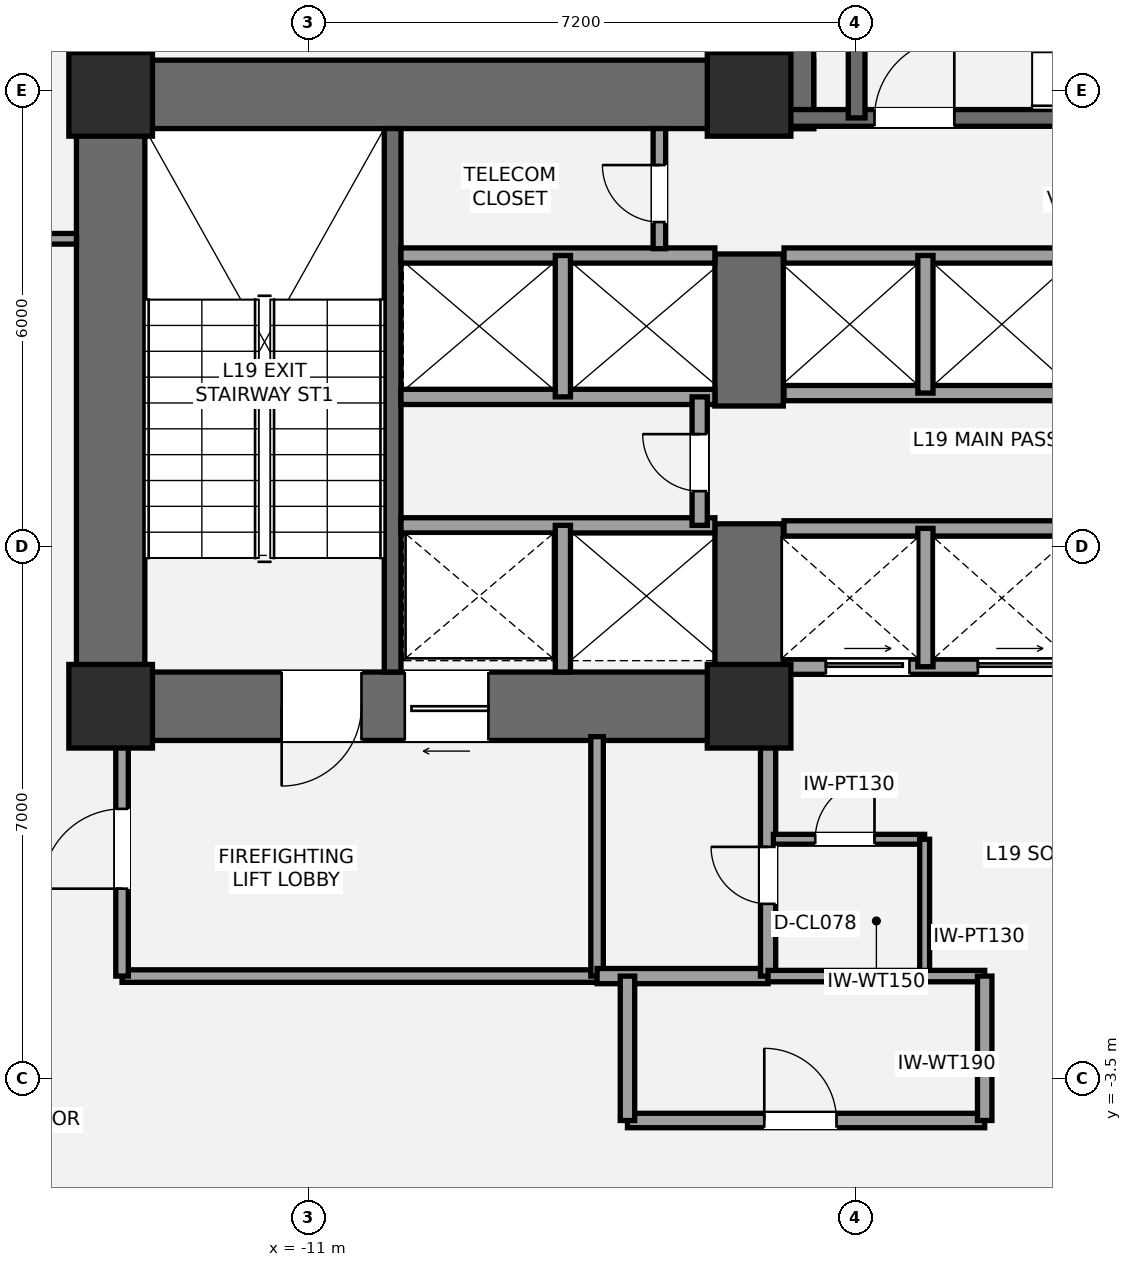
"""IFC4 building model, lengths in metres.
Left out: names, types, materials, properties, quantities, classifications, styles, units other than length and angle.
Written with IfcOpenShell. Run it as: python <this file> out.ifc"""

import sys

from ifc_helpers import new_model, si_unit, direction, frame, frame_2d, origin, origin_2d, place, context, subcontext, project, spatial, rectangle, extrude, element, fill, save


model = new_model("IFC4")
c1 = context("Model", 3, precision=1e-05, world=origin(), true_north=direction((0.0, 1.0)))
c2 = subcontext(c1, "Body", "Model", "MODEL_VIEW")
j1 = project(units=[si_unit("LENGTHUNIT", "METRE"), si_unit("PLANEANGLEUNIT", "RADIAN")], contexts=[c1])
p1 = place(None, origin())
s1 = spatial("IfcSite", under=j1, at=p1, CompositionType="ELEMENT")
p2 = place(p1, origin())
s2 = spatial("IfcBuilding", under=s1, at=p2, CompositionType="ELEMENT")
p3 = place(p2, frame((0.0, 0.0, 73.8)))
s3 = spatial("IfcBuildingStorey", under=s2, at=p3, CompositionType="ELEMENT", Elevation=73.8)
p4 = place(p3, frame((-13.6, 0.95, 0.0), z_axis=(0.0, 0.0, 1.0), x_axis=(0.0, 1.0, 0.0)))
e1 = element("IfcWall", 1, at=p4, inside=s3, PredefinedType="SHEAR", context=c2, shape_type="SweptSolid", body=[
    extrude(rectangle(XDim=8.95, YDim=0.9, at=frame_2d((4.475, 0.0))), origin(), (0.0, 0.0, 1.0), 3.6),
])
p5 = place(p3, frame((-14.05, 9.45, 0.0), z_axis=(0.0, 0.0, 1.0), x_axis=(1.0, 0.0, 0.0)))
e2 = element("IfcWall", 2, at=p5, inside=s3, PredefinedType="SHEAR", context=c2, shape_type="SweptSolid", body=[
    extrude(rectangle(XDim=9.7, YDim=0.9, at=frame_2d((4.85, 0.0))), origin(), (0.0, 0.0, 1.0), 3.6),
])
p6 = place(p3, frame((-4.75, 1.4, 0.0), z_axis=(0.0, 0.0, 1.0), x_axis=(-1.0, 0.0, 0.0)))
e3 = element("IfcWall", 3, at=p6, inside=s3, PredefinedType="SHEAR", context=c2, shape_type="SweptSolid", body=[
    extrude(rectangle(XDim=9.3, YDim=0.9, at=frame_2d((4.65, 0.0))), origin(), (0.0, 0.0, 1.0), 3.6),
])
p7 = place(p6, frame((5.55, 0.0, 0.0)))
e4 = element("IfcOpeningElement", 4, at=p7, cuts=e3, PredefinedType="OPENING", context=c2, shape_type="SweptSolid", body=[
    extrude(rectangle(XDim=1.05, YDim=2.15, at=frame_2d((0.525, 1.075))), frame((0.0, 0.46, 0.0), z_axis=(0.0, -1.0, 0.0), x_axis=(1.0, 0.0, 0.0)), (0.0, 0.0, 1.0), 0.92),
])
p8 = place(p6, frame((3.88, 0.0, 0.0)))
e5 = element("IfcOpeningElement", 5, at=p8, cuts=e3, PredefinedType="OPENING", context=c2, shape_type="SweptSolid", body=[
    extrude(rectangle(XDim=1.1, YDim=2.2, at=frame_2d((0.55, 1.1))), frame((0.0, 0.46, 0.0), z_axis=(0.0, -1.0, 0.0), x_axis=(1.0, 0.0, 0.0)), (0.0, 0.0, 1.0), 0.92),
])
p9 = place(p3, frame((-5.2, 0.95, 0.0), z_axis=(0.0, 0.0, 1.0), x_axis=(0.0, 1.0, 0.0)))
e6 = element("IfcWall", 6, at=p9, inside=s3, PredefinedType="SHEAR", context=c2, shape_type="SweptSolid", body=[
    extrude(rectangle(XDim=2.85, YDim=0.9, at=frame_2d((1.425, 0.0))), origin(), (0.0, 0.0, 1.0), 3.6),
])
p10 = place(p3, frame((-5.2, 5.35, 0.0), z_axis=(0.0, 0.0, 1.0), x_axis=(0.0, 1.0, 0.0)))
e7 = element("IfcWall", 7, at=p10, inside=s3, PredefinedType="SHEAR", context=c2, shape_type="SweptSolid", body=[
    extrude(rectangle(XDim=2.0, YDim=0.9, at=frame_2d((1.0, 0.0))), origin(), (0.0, 0.0, 1.0), 3.6),
])
p11 = place(p3, frame((-9.89, 1.85, 0.0), z_axis=(0.0, 0.0, 1.0), x_axis=(0.0, 1.0, 0.0)))
e8 = element("IfcWall", 8, at=p11, inside=s3, PredefinedType="SHEAR", context=c2, shape_type="SweptSolid", body=[
    extrude(rectangle(XDim=7.15, YDim=0.22, at=frame_2d((3.575, 0.0))), origin(), (0.0, 0.0, 1.0), 3.6),
])
p12 = place(p3, frame((-4.8, 9.0, 0.0), z_axis=(0.0, 0.0, 1.0), x_axis=(0.0, 1.0, 0.0)))
e9 = element("IfcWall", 9, at=p12, inside=s3, PredefinedType="SHEAR", context=c2, shape_type="SweptSolid", body=[
    extrude(rectangle(XDim=4.3, YDim=0.9, at=frame_2d((2.15, 0.0))), origin(), (0.0, 0.0, 1.0), 3.6),
])
p13 = place(p3, frame((-4.7, 9.14, 0.0), z_axis=(0.0, 0.0, 1.0), x_axis=(1.0, 0.0, 0.0)))
e10 = element("IfcWall", 10, at=p13, inside=s3, PredefinedType="SHEAR", context=c2, shape_type="SweptSolid", body=[
    extrude(rectangle(XDim=9.3, YDim=0.22, at=frame_2d((4.65, 0.0))), origin(), (0.0, 0.0, 1.0), 3.6),
])
p14 = place(p13, frame((1.15, 0.0, 0.0)))
e11 = element("IfcOpeningElement", 11, at=p14, cuts=e10, PredefinedType="OPENING", context=c2, shape_type="SweptSolid", body=[
    extrude(rectangle(XDim=1.05, YDim=2.15, at=frame_2d((0.525, 1.075))), frame((0.0, 0.12, 0.0), z_axis=(0.0, -1.0, 0.0), x_axis=(1.0, 0.0, 0.0)), (0.0, 0.0, 1.0), 0.24),
])
p15 = place(p3, frame((-3.785, 9.14, 0.0), z_axis=(0.0, 0.0, 1.0), x_axis=(0.0, 1.0, 0.0)))
e12 = element("IfcWall", 12, at=p15, inside=s3, PredefinedType="SHEAR", context=c2, shape_type="SweptSolid", body=[
    extrude(rectangle(XDim=3.26, YDim=0.22, at=frame_2d((1.63, 0.0))), origin(), (0.0, 0.0, 1.0), 3.6),
])
for number, where, z_axis, x_axis in (
    (13, (-13.6, 1.4, 0.0), (0.0, 0.0, 1.0), (1.0, 0.0, 0.0)),
    (14, (-13.6, 9.45, 0.0), (0.0, 0.0, 1.0), (1.0, 0.0, 0.0)),
    (15, (-5.2, 1.4, 0.0), (0.0, 0.0, 1.0), (1.0, 0.0, 0.0)),
    (16, (-5.2, 9.45, 0.0), (0.0, 0.0, 1.0), (1.0, 0.0, 0.0)),
):
    element("IfcColumn", number, at=place(p3, frame(where, z_axis=z_axis, x_axis=x_axis)), inside=s3, PredefinedType="COLUMN", context=c2, shape_type="SweptSolid", body=[
        extrude(rectangle(XDim=1.1, YDim=1.1, at=origin_2d()), origin(), (0.0, 0.0, 1.0), 3.6),
    ])
p16 = place(p3, frame((-13.45, -2.15, 0.0), z_axis=(0.0, 0.0, 1.0), x_axis=(1.0, 0.0, 0.0)))
e17 = element("IfcWall", 17, at=p16, inside=s3, PredefinedType="PARTITIONING", context=c2, shape_type="SweptSolid", body=[
    extrude(rectangle(XDim=6.25, YDim=0.165, at=frame_2d((3.125, 0.0))), origin(), (0.0, 0.0, 1.0), 2.813),
])
p17 = place(p3, frame((-13.45, -2.15, 0.0), z_axis=(0.0, 0.0, 1.0), x_axis=(0.0, 1.0, 0.0)))
e18 = element("IfcWall", 18, at=p17, inside=s3, PredefinedType="PARTITIONING", context=c2, shape_type="SweptSolid", body=[
    extrude(rectangle(XDim=3.15, YDim=0.165, at=frame_2d((1.575, 0.0))), origin(), (0.0, 0.0, 1.0), 2.813),
])
p18 = place(p17, frame((1.15, 0.0, 0.0)))
e19 = element("IfcOpeningElement", 19, at=p18, cuts=e18, PredefinedType="OPENING", context=c2, shape_type="SweptSolid", body=[
    extrude(rectangle(XDim=1.05, YDim=2.15, at=frame_2d((0.525, 1.075))), frame((0.0, 0.093, 0.0), z_axis=(0.0, -1.0, 0.0), x_axis=(1.0, 0.0, 0.0)), (0.0, 0.0, 1.0), 0.185),
])
p19 = place(p3, frame((-7.2, -2.15, 0.0), z_axis=(0.0, 0.0, 1.0), x_axis=(0.0, 1.0, 0.0)))
e20 = element("IfcWall", 20, at=p19, inside=s3, PredefinedType="PARTITIONING", context=c2, shape_type="SweptSolid", body=[
    extrude(rectangle(XDim=3.15, YDim=0.165, at=frame_2d((1.575, 0.0))), origin(), (0.0, 0.0, 1.0), 2.813),
])
p20 = place(p3, frame((-7.2, -2.15, 0.0), z_axis=(0.0, 0.0, 1.0), x_axis=(1.0, 0.0, 0.0)))
e21 = element("IfcWall", 21, at=p20, inside=s3, PredefinedType="SOLIDWALL", context=c2, shape_type="SweptSolid", body=[
    extrude(rectangle(XDim=2.25, YDim=0.2, at=frame_2d((1.125, 0.0))), origin(), (0.0, 0.0, 1.0), 3.36),
])
p21 = place(p3, frame((-4.95, -2.15, 0.0), z_axis=(0.0, 0.0, 1.0), x_axis=(0.0, 1.0, 0.0)))
e22 = element("IfcWall", 22, at=p21, inside=s3, PredefinedType="SOLIDWALL", context=c2, shape_type="SweptSolid", body=[
    extrude(rectangle(XDim=3.15, YDim=0.2, at=frame_2d((1.575, 0.0))), origin(), (0.0, 0.0, 1.0), 2.813),
])
p22 = place(p21, frame((0.95, 0.0, 0.0)))
e23 = element("IfcOpeningElement", 23, at=p22, cuts=e22, PredefinedType="OPENING", context=c2, shape_type="SweptSolid", body=[
    extrude(rectangle(XDim=0.75, YDim=2.1, at=frame_2d((0.375, 1.05))), frame((0.0, 0.11, 0.0), z_axis=(0.0, -1.0, 0.0), x_axis=(1.0, 0.0, 0.0)), (0.0, 0.0, 1.0), 0.22),
])
p23 = place(p3, frame((-4.88, -0.35, 0.0), z_axis=(0.0, 0.0, 1.0), x_axis=(1.0, 0.0, 0.0)))
e24 = element("IfcWall", 24, at=p23, inside=s3, PredefinedType="PARTITIONING", context=c2, shape_type="SweptSolid", body=[
    extrude(rectangle(XDim=1.99, YDim=0.13, at=frame_2d((0.995, 0.0))), origin(), (0.0, 0.0, 1.0), 3.36),
])
p24 = place(p23, frame((0.55, 0.0, 0.0)))
e25 = element("IfcOpeningElement", 25, at=p24, cuts=e24, PredefinedType="OPENING", context=c2, shape_type="SweptSolid", body=[
    extrude(rectangle(XDim=0.78, YDim=2.1, at=frame_2d((0.39, 1.05))), frame((0.0, 0.075, 0.0), z_axis=(0.0, -1.0, 0.0), x_axis=(1.0, 0.0, 0.0)), (0.0, 0.0, 1.0), 0.15),
])
p25 = place(p3, frame((-2.89, -2.15, 0.0), z_axis=(0.0, 0.0, 1.0), x_axis=(0.0, 1.0, 0.0)))
e26 = element("IfcWall", 26, at=p25, inside=s3, PredefinedType="PARTITIONING", context=c2, shape_type="SweptSolid", body=[
    extrude(rectangle(XDim=1.8, YDim=0.13, at=frame_2d((0.9, 0.0))), origin(), (0.0, 0.0, 1.0), 3.36),
])
p26 = place(p3, frame((-9.78, 3.78, 0.0), z_axis=(0.0, 0.0, 1.0), x_axis=(1.0, 0.0, 0.0)))
e27 = element("IfcWall", 27, at=p26, inside=s3, PredefinedType="SOLIDWALL", context=c2, shape_type="SweptSolid", body=[
    extrude(rectangle(XDim=4.13, YDim=0.2, at=frame_2d((2.065, 0.0))), origin(), (0.0, 0.0, 1.0), 3.36),
])
p27 = place(p3, frame((-7.65, 1.85, 0.0), z_axis=(0.0, 0.0, 1.0), x_axis=(0.0, 1.0, 0.0)))
e28 = element("IfcWall", 28, at=p27, inside=s3, PredefinedType="SOLIDWALL", context=c2, shape_type="SweptSolid", body=[
    extrude(rectangle(XDim=1.93, YDim=0.2, at=frame_2d((0.965, 0.0))), origin(), (0.0, 0.0, 1.0), 3.36),
])
for number, where, z_axis, x_axis in (
    (29, (-9.78, 5.47, 0.0), (0.0, 0.0, 1.0), (1.0, 0.0, 0.0)),
    (30, (-9.78, 7.33, 0.0), (0.0, 0.0, 1.0), (1.0, 0.0, 0.0)),
):
    element("IfcWall", number, at=place(p3, frame(where, z_axis=z_axis, x_axis=x_axis)), inside=s3, PredefinedType="SOLIDWALL", context=c2, shape_type="SweptSolid", body=[
        extrude(rectangle(XDim=4.13, YDim=0.2, at=frame_2d((2.065, 0.0))), origin(), (0.0, 0.0, 1.0), 3.36),
    ])
p28 = place(p3, frame((-7.65, 5.47, 0.0), z_axis=(0.0, 0.0, 1.0), x_axis=(0.0, 1.0, 0.0)))
e31 = element("IfcWall", 31, at=p28, inside=s3, PredefinedType="SOLIDWALL", context=c2, shape_type="SweptSolid", body=[
    extrude(rectangle(XDim=1.86, YDim=0.2, at=frame_2d((0.93, 0.0))), origin(), (0.0, 0.0, 1.0), 3.36),
])
p29 = place(p3, frame((-5.85, 3.78, 0.0), z_axis=(0.0, 0.0, 1.0), x_axis=(0.0, 1.0, 0.0)))
e32 = element("IfcWall", 32, at=p29, inside=s3, PredefinedType="SOLIDWALL", context=c2, shape_type="SweptSolid", body=[
    extrude(rectangle(XDim=1.69, YDim=0.2, at=frame_2d((0.845, 0.0))), origin(), (0.0, 0.0, 1.0), 3.36),
])
p30 = place(p29, frame((0.45, 0.0, 0.0)))
e33 = element("IfcOpeningElement", 33, at=p30, cuts=e32, PredefinedType="OPENING", context=c2, shape_type="SweptSolid", body=[
    extrude(rectangle(XDim=0.75, YDim=2.1, at=frame_2d((0.375, 1.05))), frame((0.0, 0.11, 0.0), z_axis=(0.0, -1.0, 0.0), x_axis=(1.0, 0.0, 0.0)), (0.0, 0.0, 1.0), 0.22),
])
p31 = place(p3, frame((-4.74, 1.92, 0.0), z_axis=(0.0, 0.0, 1.0), x_axis=(1.0, 0.0, 0.0)))
e34 = element("IfcWall", 34, at=p31, inside=s3, PredefinedType="SOLIDWALL", context=c2, shape_type="SweptSolid", body=[
    extrude(rectangle(XDim=3.86, YDim=0.2, at=frame_2d((1.93, 0.0))), origin(), (0.0, 0.0, 1.0), 2.35),
])
p32 = place(p31, frame((0.55, 0.0, 0.0)))
e35 = element("IfcOpeningElement", 35, at=p32, cuts=e34, PredefinedType="OPENING", context=c2, shape_type="SweptSolid", body=[
    extrude(rectangle(XDim=1.1, YDim=2.2, at=frame_2d((0.55, 1.1))), frame((0.0, 0.11, 0.0), z_axis=(0.0, -1.0, 0.0), x_axis=(1.0, 0.0, 0.0)), (0.0, 0.0, 1.0), 0.22),
])
p33 = place(p31, frame((2.55, 0.0, 0.0)))
e36 = element("IfcOpeningElement", 36, at=p33, cuts=e34, PredefinedType="OPENING", context=c2, shape_type="SweptSolid", body=[
    extrude(rectangle(XDim=1.1, YDim=2.2, at=frame_2d((0.55, 1.1))), frame((0.0, 0.11, 0.0), z_axis=(0.0, -1.0, 0.0), x_axis=(1.0, 0.0, 0.0)), (0.0, 0.0, 1.0), 0.22),
])
p34 = place(p3, frame((-4.74, 3.74, 0.0), z_axis=(0.0, 0.0, 1.0), x_axis=(1.0, 0.0, 0.0)))
e37 = element("IfcWall", 37, at=p34, inside=s3, PredefinedType="SOLIDWALL", context=c2, shape_type="SweptSolid", body=[
    extrude(rectangle(XDim=3.86, YDim=0.2, at=frame_2d((1.93, 0.0))), origin(), (0.0, 0.0, 1.0), 3.36),
])
p35 = place(p3, frame((-2.88, 1.92, 0.0), z_axis=(0.0, 0.0, 1.0), x_axis=(0.0, 1.0, 0.0)))
e38 = element("IfcWall", 38, at=p35, inside=s3, PredefinedType="SOLIDWALL", context=c2, shape_type="SweptSolid", body=[
    extrude(rectangle(XDim=1.82, YDim=0.2, at=frame_2d((0.91, 0.0))), origin(), (0.0, 0.0, 1.0), 3.36),
])
for number, where, z_axis, x_axis in (
    (39, (-4.74, 5.52, 0.0), (0.0, 0.0, 1.0), (1.0, 0.0, 0.0)),
    (40, (-4.74, 7.33, 0.0), (0.0, 0.0, 1.0), (1.0, 0.0, 0.0)),
):
    element("IfcWall", number, at=place(p3, frame(where, z_axis=z_axis, x_axis=x_axis)), inside=s3, PredefinedType="SOLIDWALL", context=c2, shape_type="SweptSolid", body=[
        extrude(rectangle(XDim=3.86, YDim=0.2, at=frame_2d((1.93, 0.0))), origin(), (0.0, 0.0, 1.0), 3.36),
    ])
p36 = place(p3, frame((-2.88, 5.52, 0.0), z_axis=(0.0, 0.0, 1.0), x_axis=(0.0, 1.0, 0.0)))
e41 = element("IfcWall", 41, at=p36, inside=s3, PredefinedType="SOLIDWALL", context=c2, shape_type="SweptSolid", body=[
    extrude(rectangle(XDim=1.81, YDim=0.2, at=frame_2d((0.905, 0.0))), origin(), (0.0, 0.0, 1.0), 3.36),
])
p37 = place(p3, frame((-6.38, 7.42, 0.0), z_axis=(0.0, 0.0, 1.0), x_axis=(0.0, 1.0, 0.0)))
e42 = element("IfcWall", 42, at=p37, inside=s3, PredefinedType="PARTITIONING", context=c2, shape_type="SweptSolid", body=[
    extrude(rectangle(XDim=1.58, YDim=0.165, at=frame_2d((0.79, 0.0))), origin(), (0.0, 0.0, 1.0), 3.36),
])
p38 = place(p37, frame((0.35, 0.0, 0.0)))
e43 = element("IfcOpeningElement", 43, at=p38, cuts=e42, PredefinedType="OPENING", context=c2, shape_type="SweptSolid", body=[
    extrude(rectangle(XDim=0.75, YDim=2.1, at=frame_2d((0.375, 1.05))), frame((0.0, 0.093, 0.0), z_axis=(0.0, -1.0, 0.0), x_axis=(1.0, 0.0, 0.0)), (0.0, 0.0, 1.0), 0.185),
])
p39 = place(p3, frame((-6.8, -4.05, 0.0), z_axis=(0.0, 0.0, 1.0), x_axis=(1.0, 0.0, 0.0)))
e44 = element("IfcWall", 44, at=p39, inside=s3, PredefinedType="PLUMBINGWALL", context=c2, shape_type="SweptSolid", body=[
    extrude(rectangle(XDim=4.7, YDim=0.19, at=frame_2d((2.35, 0.0))), origin(), (0.0, 0.0, 1.0), 2.893),
])
p40 = place(p39, frame((1.8, 0.0, 0.0)))
e45 = element("IfcOpeningElement", 45, at=p40, cuts=e44, PredefinedType="OPENING", context=c2, shape_type="SweptSolid", body=[
    extrude(rectangle(XDim=0.95, YDim=2.15, at=frame_2d((0.475, 1.075))), frame((0.0, 0.105, 0.0), z_axis=(0.0, -1.0, 0.0), x_axis=(1.0, 0.0, 0.0)), (0.0, 0.0, 1.0), 0.21),
])
p41 = place(p3, frame((-4.95, -2.15, 0.0), z_axis=(0.0, 0.0, 1.0), x_axis=(1.0, 0.0, 0.0)))
e46 = element("IfcWall", 46, at=p41, inside=s3, PredefinedType="PLUMBINGWALL", context=c2, shape_type="SweptSolid", body=[
    extrude(rectangle(XDim=2.85, YDim=0.15, at=frame_2d((1.425, 0.0))), origin(), (0.0, 0.0, 1.0), 3.36),
])
for number, where, z_axis, x_axis in (
    (47, (-6.8, -4.05, 0.0), (0.0, 0.0, 1.0), (0.0, 1.0, 0.0)),
    (48, (-2.1, -4.05, 0.0), (0.0, 0.0, 1.0), (0.0, 1.0, 0.0)),
):
    element("IfcWall", number, at=place(p3, frame(where, z_axis=z_axis, x_axis=x_axis)), inside=s3, PredefinedType="PLUMBINGWALL", context=c2, shape_type="SweptSolid", body=[
        extrude(rectangle(XDim=1.9, YDim=0.19, at=frame_2d((0.95, 0.0))), origin(), (0.0, 0.0, 1.0), 3.36),
    ])
p42 = place(p3, frame((-26.248, 7.55, 0.0), z_axis=(0.0, 0.0, 1.0), x_axis=(1.0, 0.0, 0.0)))
e49 = element("IfcWall", 49, at=p42, inside=s3, PredefinedType="PARTITIONING", context=c2, shape_type="SweptSolid", body=[
    extrude(rectangle(XDim=12.198, YDim=0.14, at=frame_2d((6.099, 0.0))), origin(), (0.0, 0.0, 1.0), 2.813),
])
p43 = place(p42, frame((1.823, 0.0, 0.0)))
e50 = element("IfcOpeningElement", 50, at=p43, cuts=e49, PredefinedType="OPENING", context=c2, shape_type="SweptSolid", body=[
    extrude(rectangle(XDim=0.92, YDim=2.15, at=frame_2d((0.46, 1.075))), frame((0.0, 0.08, 0.0), z_axis=(0.0, -1.0, 0.0), x_axis=(1.0, 0.0, 0.0)), (0.0, 0.0, 1.0), 0.16),
])
p44 = place(p7, origin())
e51 = element("IfcDoor", 51, at=p44, inside=s3, OperationType="SINGLE_SWING_RIGHT", PredefinedType="DOOR", context=c2, shape_type="SweptSolid", body=[
    extrude(rectangle(XDim=1.05, YDim=2.15, at=frame_2d((0.525, 1.075))), frame((0.0, 0.025, 0.0), z_axis=(0.0, -1.0, 0.0), x_axis=(1.0, 0.0, 0.0)), (0.0, 0.0, 1.0), 0.05),
])
fill(e4, e51)
p45 = place(p14, origin())
e52 = element("IfcDoor", 52, at=p45, inside=s3, OperationType="SINGLE_SWING_RIGHT", PredefinedType="DOOR", context=c2, shape_type="SweptSolid", body=[
    extrude(rectangle(XDim=1.05, YDim=2.15, at=frame_2d((0.525, 1.075))), frame((0.0, 0.025, 0.0), z_axis=(0.0, -1.0, 0.0), x_axis=(1.0, 0.0, 0.0)), (0.0, 0.0, 1.0), 0.05),
])
fill(e11, e52)
p46 = place(p18, origin())
e53 = element("IfcDoor", 53, at=p46, inside=s3, OperationType="SINGLE_SWING_LEFT", PredefinedType="DOOR", context=c2, shape_type="SweptSolid", body=[
    extrude(rectangle(XDim=1.05, YDim=2.15, at=frame_2d((0.525, 1.075))), frame((0.0, 0.025, 0.0), z_axis=(0.0, -1.0, 0.0), x_axis=(1.0, 0.0, 0.0)), (0.0, 0.0, 1.0), 0.05),
])
fill(e19, e53)
p47 = place(p22, origin())
e54 = element("IfcDoor", 54, at=p47, inside=s3, OperationType="SINGLE_SWING_RIGHT", PredefinedType="DOOR", context=c2, shape_type="SweptSolid", body=[
    extrude(rectangle(XDim=0.75, YDim=2.1, at=frame_2d((0.375, 1.05))), frame((0.0, 0.025, 0.0), z_axis=(0.0, -1.0, 0.0), x_axis=(1.0, 0.0, 0.0)), (0.0, 0.0, 1.0), 0.05),
])
fill(e23, e54)
p48 = place(p24, origin())
e55 = element("IfcDoor", 55, at=p48, inside=s3, OperationType="SINGLE_SWING_RIGHT", PredefinedType="DOOR", context=c2, shape_type="SweptSolid", body=[
    extrude(rectangle(XDim=0.78, YDim=2.1, at=frame_2d((0.39, 1.05))), frame((0.0, 0.025, 0.0), z_axis=(0.0, -1.0, 0.0), x_axis=(1.0, 0.0, 0.0)), (0.0, 0.0, 1.0), 0.05),
])
fill(e25, e55)
p49 = place(p8, origin())
e56 = element("IfcDoor", 56, at=p49, inside=s3, OperationType="SLIDING_TO_LEFT", PredefinedType="DOOR", context=c2, shape_type="SweptSolid", body=[
    extrude(rectangle(XDim=1.1, YDim=2.2, at=frame_2d((0.55, 1.1))), frame((0.0, 0.025, 0.0), z_axis=(0.0, -1.0, 0.0), x_axis=(1.0, 0.0, 0.0)), (0.0, 0.0, 1.0), 0.05),
])
fill(e5, e56)
p50 = place(p30, origin())
e57 = element("IfcDoor", 57, at=p50, inside=s3, OperationType="SINGLE_SWING_RIGHT", PredefinedType="DOOR", context=c2, shape_type="SweptSolid", body=[
    extrude(rectangle(XDim=0.75, YDim=2.1, at=frame_2d((0.375, 1.05))), frame((0.0, 0.025, 0.0), z_axis=(0.0, -1.0, 0.0), x_axis=(1.0, 0.0, 0.0)), (0.0, 0.0, 1.0), 0.05),
])
fill(e33, e57)
p51 = place(p32, origin())
e58 = element("IfcDoor", 58, at=p51, inside=s3, OperationType="SLIDING_TO_LEFT", PredefinedType="DOOR", context=c2, shape_type="SweptSolid", body=[
    extrude(rectangle(XDim=1.1, YDim=2.2, at=frame_2d((0.55, 1.1))), frame((0.0, 0.025, 0.0), z_axis=(0.0, -1.0, 0.0), x_axis=(1.0, 0.0, 0.0)), (0.0, 0.0, 1.0), 0.05),
])
fill(e35, e58)
p52 = place(p33, origin())
e59 = element("IfcDoor", 59, at=p52, inside=s3, OperationType="SLIDING_TO_LEFT", PredefinedType="DOOR", context=c2, shape_type="SweptSolid", body=[
    extrude(rectangle(XDim=1.1, YDim=2.2, at=frame_2d((0.55, 1.1))), frame((0.0, 0.025, 0.0), z_axis=(0.0, -1.0, 0.0), x_axis=(1.0, 0.0, 0.0)), (0.0, 0.0, 1.0), 0.05),
])
fill(e36, e59)
p53 = place(p38, origin())
e60 = element("IfcDoor", 60, at=p53, inside=s3, OperationType="SINGLE_SWING_RIGHT", PredefinedType="DOOR", context=c2, shape_type="SweptSolid", body=[
    extrude(rectangle(XDim=0.75, YDim=2.1, at=frame_2d((0.375, 1.05))), frame((0.0, 0.025, 0.0), z_axis=(0.0, -1.0, 0.0), x_axis=(1.0, 0.0, 0.0)), (0.0, 0.0, 1.0), 0.05),
])
fill(e43, e60)
p54 = place(p40, origin())
e61 = element("IfcDoor", 61, at=p54, inside=s3, OperationType="SINGLE_SWING_LEFT", PredefinedType="DOOR", context=c2, shape_type="SweptSolid", body=[
    extrude(rectangle(XDim=0.95, YDim=2.15, at=frame_2d((0.475, 1.075))), frame((0.0, 0.025, 0.0), z_axis=(0.0, -1.0, 0.0), x_axis=(1.0, 0.0, 0.0)), (0.0, 0.0, 1.0), 0.05),
])
fill(e45, e61)
save(model, sys.argv[1])
